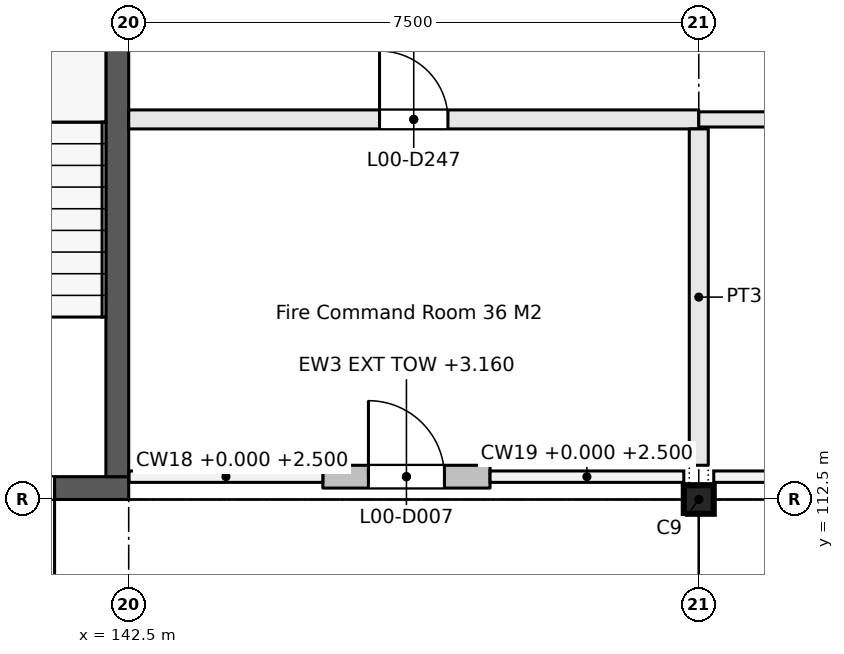
"""IFC4 building model, lengths in metres.
Left out: names, types, materials, properties, quantities, classifications, styles, units other than length and angle.
Written with IfcOpenShell. Run it as: python <this file> out.ifc"""

import sys

from ifc_helpers import new_model, si_unit, direction, frame, frame_2d, origin, origin_2d, place, context, subcontext, project, spatial, rectangle, i_section, extrude, element, fill, save


model = new_model("IFC4")
c1 = context("Model", 3, precision=1e-05, world=origin(), true_north=direction((0.0, 1.0)))
c2 = subcontext(c1, "Body", "Model", "MODEL_VIEW")
j1 = project(units=[si_unit("LENGTHUNIT", "METRE"), si_unit("PLANEANGLEUNIT", "RADIAN")], contexts=[c1])
p1 = place(None, origin())
s1 = spatial("IfcSite", under=j1, at=p1, CompositionType="ELEMENT")
p2 = place(p1, origin())
s2 = spatial("IfcBuilding", under=s1, at=p2, CompositionType="ELEMENT")
p3 = place(p2, origin())
s3 = spatial("IfcBuildingStorey", under=s2, at=p3, CompositionType="ELEMENT", Elevation=0.0)
p4 = place(p3, frame((150.0, 112.5, -0.25), z_axis=(0.0, 0.0, 1.0), x_axis=(1.0, 0.0, 0.0)))
e1 = element("IfcColumn", 1, at=p4, inside=s3, PredefinedType="COLUMN", context=c2, shape_type="SweptSolid", body=[
    extrude(i_section(OverallWidth=0.394, OverallDepth=0.376, WebThickness=0.017, FlangeThickness=0.028, FilletRadius=0.015, at=origin_2d()), origin(), (0.0, 0.0, 1.0), 3.55),
])
p5 = place(p3, frame((142.5, 117.5, 0.0), z_axis=(0.0, 0.0, 1.0), x_axis=(1.0, 0.0, 0.0)))
e2 = element("IfcWall", 2, at=p5, inside=s3, PredefinedType="PARTITIONING", context=c2, shape_type="SweptSolid", body=[
    extrude(rectangle(XDim=7.5, YDim=0.25, at=frame_2d((3.75, 0.0))), origin(), (0.0, 0.0, 1.0), 2.548),
])
p6 = place(p5, frame((3.3, 0.0, 0.0)))
e3 = element("IfcOpeningElement", 3, at=p6, cuts=e2, PredefinedType="OPENING", context=c2, shape_type="SweptSolid", body=[
    extrude(rectangle(XDim=0.9, YDim=2.1, at=frame_2d((0.45, 1.05))), frame((0.0, 0.135, 0.0), z_axis=(0.0, -1.0, 0.0), x_axis=(1.0, 0.0, 0.0)), (0.0, 0.0, 1.0), 0.27),
])
p7 = place(p3, frame((150.0, 117.5, 0.0), z_axis=(0.0, 0.0, 1.0), x_axis=(1.0, 0.0, 0.0)))
e4 = element("IfcWall", 4, at=p7, inside=s3, PredefinedType="PARTITIONING", context=c2, shape_type="SweptSolid", body=[
    extrude(rectangle(XDim=22.6, YDim=0.2, at=frame_2d((11.3, 0.0))), origin(), (0.0, 0.0, 1.0), 2.548),
])
p8 = place(p7, frame((3.55, 0.0, 0.0)))
e5 = element("IfcOpeningElement", 5, at=p8, cuts=e4, PredefinedType="OPENING", context=c2, shape_type="SweptSolid", body=[
    extrude(rectangle(XDim=0.9, YDim=2.1, at=frame_2d((0.45, 1.05))), frame((0.0, 0.11, 0.0), z_axis=(0.0, -1.0, 0.0), x_axis=(1.0, 0.0, 0.0)), (0.0, 0.0, 1.0), 0.22),
])
p9 = place(p7, frame((10.775, 0.0, 0.0)))
e6 = element("IfcOpeningElement", 6, at=p9, cuts=e4, PredefinedType="OPENING", context=c2, shape_type="SweptSolid", body=[
    extrude(rectangle(XDim=0.9, YDim=2.1, at=frame_2d((0.45, 1.05))), frame((0.0, 0.11, 0.0), z_axis=(0.0, -1.0, 0.0), x_axis=(1.0, 0.0, 0.0)), (0.0, 0.0, 1.0), 0.22),
])
p10 = place(p7, frame((18.275, 0.0, 0.0)))
e7 = element("IfcOpeningElement", 7, at=p10, cuts=e4, PredefinedType="OPENING", context=c2, shape_type="SweptSolid", body=[
    extrude(rectangle(XDim=0.9, YDim=2.1, at=frame_2d((0.45, 1.05))), frame((0.0, 0.11, 0.0), z_axis=(0.0, -1.0, 0.0), x_axis=(1.0, 0.0, 0.0)), (0.0, 0.0, 1.0), 0.22),
])
p11 = place(p3, frame((150.0, 112.95, 0.0), z_axis=(0.0, 0.0, 1.0), x_axis=(0.0, 1.0, 0.0)))
e8 = element("IfcWall", 8, at=p11, inside=s3, PredefinedType="PARTITIONING", context=c2, shape_type="SweptSolid", body=[
    extrude(rectangle(XDim=4.425, YDim=0.25, at=frame_2d((2.212, 0.0))), origin(), (0.0, 0.0, 1.0), 2.548),
])
p12 = place(p3, frame((145.054, 112.8, 0.0), z_axis=(0.0, 0.0, 1.0), x_axis=(1.0, 0.0, 0.0)))
e9 = element("IfcWall", 9, at=p12, inside=s3, PredefinedType="SOLIDWALL", context=c2, shape_type="SweptSolid", body=[
    extrude(rectangle(XDim=2.2, YDim=0.3, at=frame_2d((1.1, 0.0))), origin(), (0.0, 0.0, 1.0), 3.16),
])
p13 = place(p12, frame((0.6, 0.0, 0.0)))
e10 = element("IfcOpeningElement", 10, at=p13, cuts=e9, PredefinedType="OPENING", context=c2, shape_type="SweptSolid", body=[
    extrude(rectangle(XDim=1.0, YDim=2.1, at=frame_2d((0.5, 1.05))), frame((0.0, 0.16, 0.0), z_axis=(0.0, -1.0, 0.0), x_axis=(1.0, 0.0, 0.0)), (0.0, 0.0, 1.0), 0.32),
])
p14 = place(p3, frame((142.5, 112.65, 0.0), z_axis=(0.0, 0.0, 1.0), x_axis=(-1.0, 0.0, 0.0)))
e11 = element("IfcWall", 11, at=p14, inside=s3, PredefinedType="SHEAR", context=c2, shape_type="SweptSolid", body=[
    extrude(rectangle(XDim=5.0, YDim=0.3, at=frame_2d((2.5, 0.0))), origin(), (0.0, 0.0, 1.0), 3.3),
])
p15 = place(p14, frame((0.975, 0.0, 0.0)))
e12 = element("IfcOpeningElement", 12, at=p15, cuts=e11, PredefinedType="OPENING", context=c2, shape_type="SweptSolid", body=[
    extrude(rectangle(XDim=1.2, YDim=2.1, at=frame_2d((0.6, 1.05))), frame((0.0, 0.16, 0.0), z_axis=(0.0, -1.0, 0.0), x_axis=(1.0, 0.0, 0.0)), (0.0, 0.0, 1.0), 0.32),
])
p16 = place(p3, frame((142.35, 119.7, 0.0), z_axis=(0.0, 0.0, 1.0), x_axis=(0.0, -1.0, 0.0)))
e13 = element("IfcWall", 13, at=p16, inside=s3, PredefinedType="SHEAR", context=c2, shape_type="SweptSolid", body=[
    extrude(rectangle(XDim=6.9, YDim=0.3, at=frame_2d((3.45, 0.0))), origin(), (0.0, 0.0, 1.0), 3.3),
])
p17 = place(p6, origin())
e14 = element("IfcDoor", 14, at=p17, inside=s3, OperationType="SINGLE_SWING_RIGHT", PredefinedType="DOOR", context=c2, shape_type="SweptSolid", body=[
    extrude(rectangle(XDim=0.9, YDim=2.1, at=frame_2d((0.45, 1.05))), frame((0.0, 0.025, 0.0), z_axis=(0.0, -1.0, 0.0), x_axis=(1.0, 0.0, 0.0)), (0.0, 0.0, 1.0), 0.05),
])
fill(e3, e14)
p18 = place(p13, origin())
e15 = element("IfcDoor", 15, at=p18, inside=s3, OperationType="SINGLE_SWING_RIGHT", PredefinedType="DOOR", context=c2, shape_type="SweptSolid", body=[
    extrude(rectangle(XDim=1.0, YDim=2.1, at=frame_2d((0.5, 1.05))), frame((0.0, 0.025, 0.0), z_axis=(0.0, -1.0, 0.0), x_axis=(1.0, 0.0, 0.0)), (0.0, 0.0, 1.0), 0.05),
])
fill(e10, e15)
p19 = place(p15, origin())
e16 = element("IfcDoor", 16, at=p19, inside=s3, OperationType="SINGLE_SWING_LEFT", PredefinedType="DOOR", context=c2, shape_type="SweptSolid", body=[
    extrude(rectangle(XDim=1.2, YDim=2.1, at=frame_2d((0.6, 1.05))), frame((0.0, 0.025, 0.0), z_axis=(0.0, -1.0, 0.0), x_axis=(1.0, 0.0, 0.0)), (0.0, 0.0, 1.0), 0.05),
])
fill(e12, e16)
save(model, sys.argv[1])
